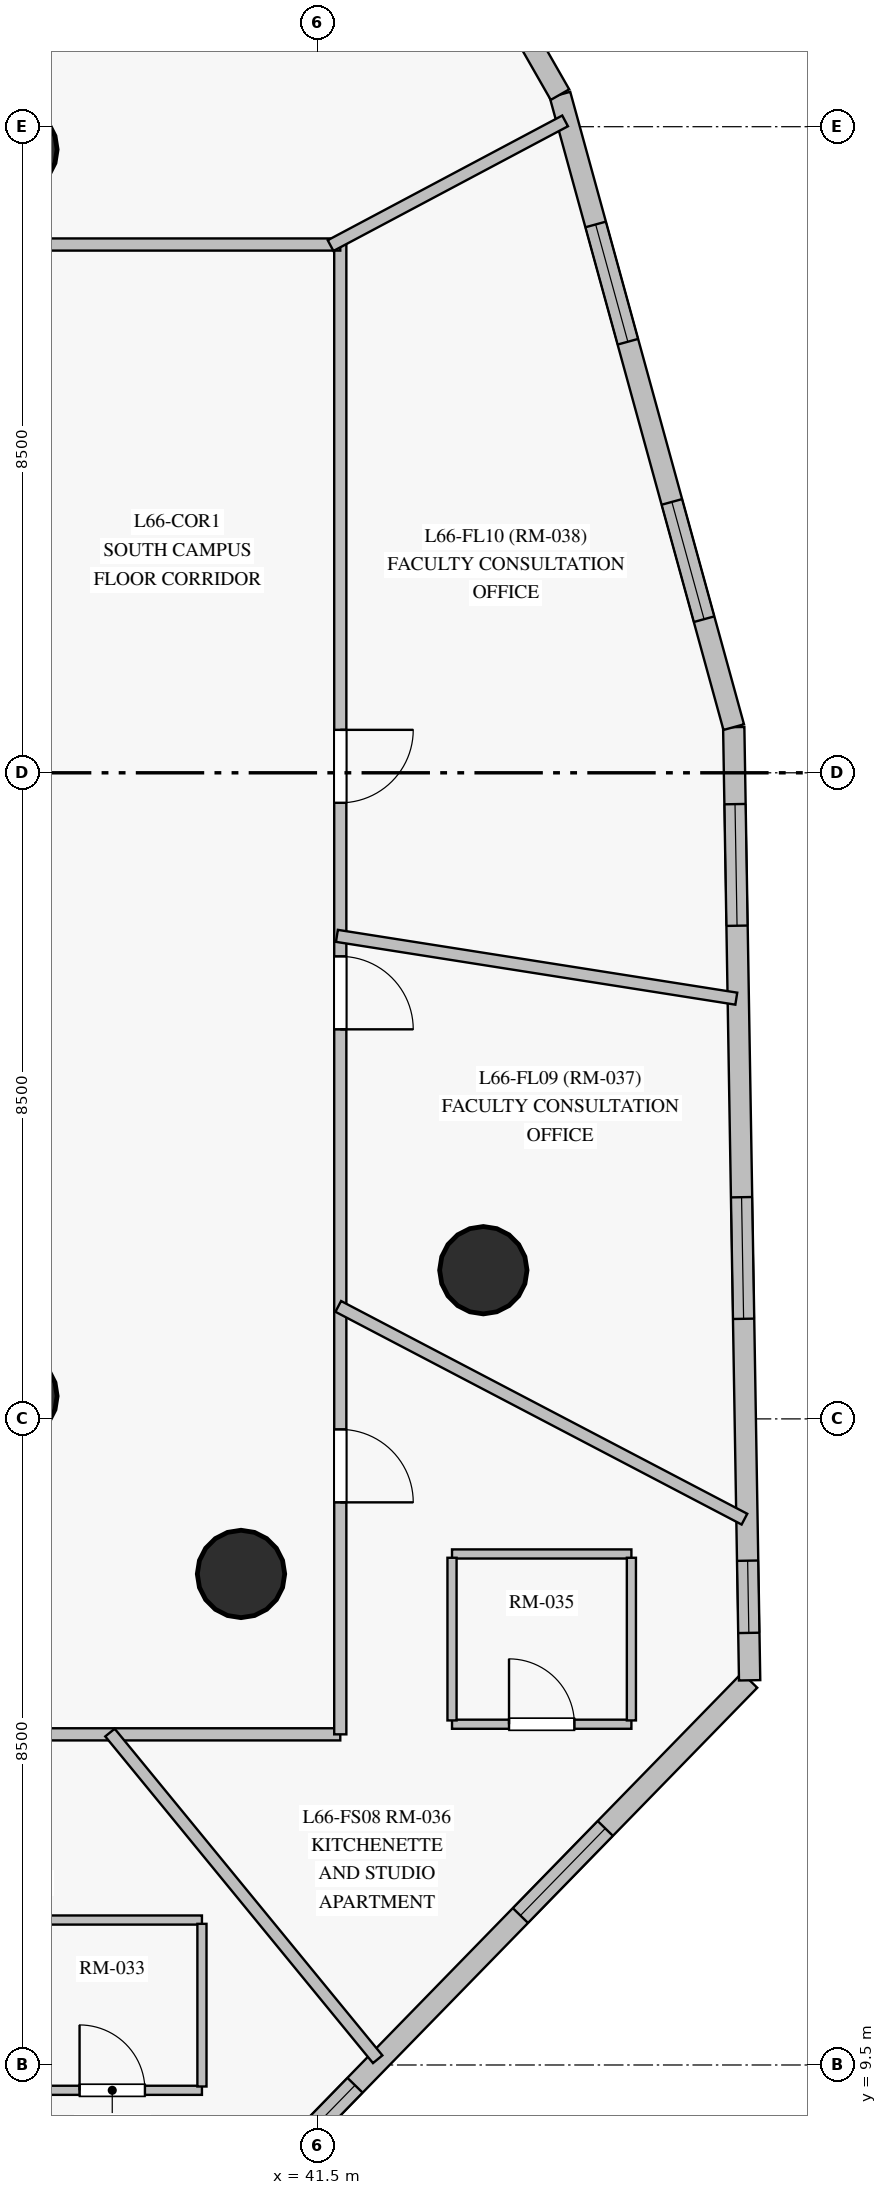
"""IFC4 building model, lengths in metres.
Left out: names, types, materials, properties, quantities, classifications, styles, units other than length and angle.
Written with IfcOpenShell. Run it as: python <this file> out.ifc"""

import sys

from ifc_helpers import new_model, si_unit, direction, frame, frame_2d, origin, origin_with_axes, origin_2d, place, context, subcontext, project, spatial, rectangle, circle, extrude, source, transform, mapped, element, fill, save


model = new_model("IFC4")
c1 = context("Model", 3, precision=1e-05, world=origin(), true_north=direction((0.0, 1.0)))
c2 = subcontext(c1, "Body", "Model", "MODEL_VIEW")
j1 = project(units=[si_unit("LENGTHUNIT", "METRE"), si_unit("PLANEANGLEUNIT", "RADIAN")], contexts=[c1])
p1 = place(None, origin())
s1 = spatial("IfcSite", under=j1, at=p1, CompositionType="ELEMENT")
p2 = place(p1, origin())
s2 = spatial("IfcBuilding", under=s1, at=p2, CompositionType="ELEMENT")
p3 = place(p2, frame((0.0, 0.0, 226.05)))
s3 = spatial("IfcBuildingStorey", under=s2, at=p3, CompositionType="ELEMENT", Elevation=226.05)
m1 = source(origin_with_axes(), c2, "Body", "SweptSolid", [
    extrude(circle(Radius=0.575, at=origin_2d()), origin(), (0.0, 0.0, 1.0), 3.05),
])
for number, where, z_axis, x_axis in (
    (1, (37.5, 18.3, 0.0), (0.0, 0.0, 1.0), (1.0, 0.0, 0.0)),
    (2, (37.5, 34.7, 0.0), (0.0, 0.0, 1.0), (1.0, 0.0, 0.0)),
    (3, (43.682, 19.956, 0.0), (0.0, 0.0, 1.0), (1.0, 0.0, 0.0)),
    (4, (40.494, 15.96, 0.0), (0.0, 0.0, 1.0), (1.0, 0.0, 0.0)),
):
    element("IfcColumn", number, at=place(p3, frame(where, z_axis=z_axis, x_axis=x_axis)), inside=s3, PredefinedType="COLUMN", context=c2, shape_type="MappedRepresentation", body=[
        mapped(m1, transform((0.0, 0.0, 0.0), scale=1.0)),
    ])
p4 = place(p3, frame((40.517, 7.717, 0.0), z_axis=(0.0, 0.0, 1.0), x_axis=(0.69791379091, 0.716181778921, 0.0)))
e5 = element("IfcWall", 5, at=p4, inside=s3, PredefinedType="SOLIDWALL", context=c2, shape_type="SweptSolid", body=[
    extrude(rectangle(XDim=9.556, YDim=0.28, at=frame_2d((4.778, 0.0))), origin(), (0.0, 0.0, 1.0), 2.85),
])
p5 = place(p4, frame((0.517, 0.0, 0.85)))
e6 = element("IfcOpeningElement", 6, at=p5, cuts=e5, PredefinedType="OPENING", context=c2, shape_type="SweptSolid", body=[
    extrude(rectangle(XDim=1.6, YDim=1.6, at=frame_2d((0.8, 0.8))), frame((0.0, 0.15, 0.0), z_axis=(0.0, -1.0, 0.0), x_axis=(1.0, 0.0, 0.0)), (0.0, 0.0, 1.0), 0.3),
])
p6 = place(p4, frame((5.235, 0.0, 0.85)))
e7 = element("IfcOpeningElement", 7, at=p6, cuts=e5, PredefinedType="OPENING", context=c2, shape_type="SweptSolid", body=[
    extrude(rectangle(XDim=1.6, YDim=1.6, at=frame_2d((0.8, 0.8))), frame((0.0, 0.15, 0.0), z_axis=(0.0, -1.0, 0.0), x_axis=(1.0, 0.0, 0.0)), (0.0, 0.0, 1.0), 0.3),
])
p7 = place(p3, frame((47.186, 14.561, 0.0), z_axis=(0.0, 0.0, 1.0), x_axis=(-0.016682840426, 0.999860831734, 0.0)))
e8 = element("IfcWall", 8, at=p7, inside=s3, PredefinedType="SOLIDWALL", context=c2, shape_type="SweptSolid", body=[
    extrude(rectangle(XDim=12.542, YDim=0.28, at=frame_2d((6.271, 0.0))), origin(), (0.0, 0.0, 1.0), 2.85),
])
p8 = place(p7, frame((0.624, 0.0, 0.85)))
e9 = element("IfcOpeningElement", 9, at=p8, cuts=e8, PredefinedType="OPENING", context=c2, shape_type="SweptSolid", body=[
    extrude(rectangle(XDim=0.95, YDim=1.5, at=frame_2d((0.475, 0.75))), frame((0.0, 0.15, 0.0), z_axis=(0.0, -1.0, 0.0), x_axis=(1.0, 0.0, 0.0)), (0.0, 0.0, 1.0), 0.3),
])
p9 = place(p7, frame((4.757, 0.0, 0.85)))
e10 = element("IfcOpeningElement", 10, at=p9, cuts=e8, PredefinedType="OPENING", context=c2, shape_type="SweptSolid", body=[
    extrude(rectangle(XDim=1.6, YDim=1.6, at=frame_2d((0.8, 0.8))), frame((0.0, 0.15, 0.0), z_axis=(0.0, -1.0, 0.0), x_axis=(1.0, 0.0, 0.0)), (0.0, 0.0, 1.0), 0.3),
])
p10 = place(p7, frame((9.928, 0.0, 0.85)))
e11 = element("IfcOpeningElement", 11, at=p10, cuts=e8, PredefinedType="OPENING", context=c2, shape_type="SweptSolid", body=[
    extrude(rectangle(XDim=1.6, YDim=1.6, at=frame_2d((0.8, 0.8))), frame((0.0, 0.15, 0.0), z_axis=(0.0, -1.0, 0.0), x_axis=(1.0, 0.0, 0.0)), (0.0, 0.0, 1.0), 0.3),
])
p11 = place(p3, frame((46.976, 27.101, 0.0), z_axis=(0.0, 0.0, 1.0), x_axis=(-0.264883595198, 0.964280395422, 0.0)))
e12 = element("IfcWall", 12, at=p11, inside=s3, PredefinedType="SOLIDWALL", context=c2, shape_type="SweptSolid", body=[
    extrude(rectangle(XDim=8.63, YDim=0.28, at=frame_2d((4.315, 0.0))), origin(), (0.0, 0.0, 1.0), 2.85),
])
p12 = place(p11, frame((1.473, 0.0, 0.85)))
e13 = element("IfcOpeningElement", 13, at=p12, cuts=e12, PredefinedType="OPENING", context=c2, shape_type="SweptSolid", body=[
    extrude(rectangle(XDim=1.6, YDim=1.6, at=frame_2d((0.8, 0.8))), frame((0.0, 0.15, 0.0), z_axis=(0.0, -1.0, 0.0), x_axis=(1.0, 0.0, 0.0)), (0.0, 0.0, 1.0), 0.3),
])
p13 = place(p11, frame((5.258, 0.0, 0.85)))
e14 = element("IfcOpeningElement", 14, at=p13, cuts=e12, PredefinedType="OPENING", context=c2, shape_type="SweptSolid", body=[
    extrude(rectangle(XDim=1.6, YDim=1.6, at=frame_2d((0.8, 0.8))), frame((0.0, 0.15, 0.0), z_axis=(0.0, -1.0, 0.0), x_axis=(1.0, 0.0, 0.0)), (0.0, 0.0, 1.0), 0.3),
])
p14 = place(p3, frame((44.69, 35.422, 0.0), z_axis=(0.0, 0.0, 1.0), x_axis=(-0.496436598051, 0.868072983173, 0.0)))
e15 = element("IfcWall", 15, at=p14, inside=s3, PredefinedType="SOLIDWALL", context=c2, shape_type="SweptSolid", body=[
    extrude(rectangle(XDim=12.542, YDim=0.28, at=frame_2d((6.271, 0.0))), origin(), (0.0, 0.0, 1.0), 2.85),
])
p15 = place(p14, frame((1.544, 0.0, 0.85)))
e16 = element("IfcOpeningElement", 16, at=p15, cuts=e15, PredefinedType="OPENING", context=c2, shape_type="SweptSolid", body=[
    extrude(rectangle(XDim=1.6, YDim=1.6, at=frame_2d((0.8, 0.8))), frame((0.0, 0.15, 0.0), z_axis=(0.0, -1.0, 0.0), x_axis=(1.0, 0.0, 0.0)), (0.0, 0.0, 1.0), 0.3),
])
p16 = place(p14, frame((5.471, 0.0, 0.85)))
e17 = element("IfcOpeningElement", 17, at=p16, cuts=e15, PredefinedType="OPENING", context=c2, shape_type="SweptSolid", body=[
    extrude(rectangle(XDim=1.6, YDim=1.6, at=frame_2d((0.8, 0.8))), frame((0.0, 0.15, 0.0), z_axis=(0.0, -1.0, 0.0), x_axis=(1.0, 0.0, 0.0)), (0.0, 0.0, 1.0), 0.3),
])
p17 = place(p14, frame((9.398, 0.0, 0.85)))
e18 = element("IfcOpeningElement", 18, at=p17, cuts=e15, PredefinedType="OPENING", context=c2, shape_type="SweptSolid", body=[
    extrude(rectangle(XDim=1.6, YDim=1.6, at=frame_2d((0.8, 0.8))), frame((0.0, 0.15, 0.0), z_axis=(0.0, -1.0, 0.0), x_axis=(1.0, 0.0, 0.0)), (0.0, 0.0, 1.0), 0.3),
])
p18 = place(p3, frame((41.8, 13.85, 0.0), z_axis=(0.0, 0.0, 1.0), x_axis=(-1.0, 0.0, 0.0)))
e19 = element("IfcWall", 19, at=p18, inside=s3, PredefinedType="PARTITIONING", context=c2, shape_type="SweptSolid", body=[
    extrude(rectangle(XDim=25.05, YDim=0.16, at=frame_2d((12.525, 0.0))), origin(), (0.0, 0.0, 1.0), 2.3),
])
p19 = place(p18, frame((9.563, 0.0, 0.0)))
e20 = element("IfcOpeningElement", 20, at=p19, cuts=e19, PredefinedType="OPENING", context=c2, shape_type="SweptSolid", body=[
    extrude(rectangle(XDim=0.96, YDim=2.15, at=frame_2d((0.48, 1.075))), frame((0.0, 0.09, 0.0), z_axis=(0.0, -1.0, 0.0), x_axis=(1.0, 0.0, 0.0)), (0.0, 0.0, 1.0), 0.18),
])
p20 = place(p18, frame((4.621, 0.0, 0.0)))
e21 = element("IfcOpeningElement", 21, at=p20, cuts=e19, PredefinedType="OPENING", context=c2, shape_type="SweptSolid", body=[
    extrude(rectangle(XDim=0.96, YDim=2.15, at=frame_2d((0.48, 1.075))), frame((0.0, 0.09, 0.0), z_axis=(0.0, -1.0, 0.0), x_axis=(1.0, 0.0, 0.0)), (0.0, 0.0, 1.0), 0.18),
])
p21 = place(p18, frame((18.312, 0.0, 0.0)))
e22 = element("IfcOpeningElement", 22, at=p21, cuts=e19, PredefinedType="OPENING", context=c2, shape_type="SweptSolid", body=[
    extrude(rectangle(XDim=0.96, YDim=2.15, at=frame_2d((0.48, 1.075))), frame((0.0, 0.09, 0.0), z_axis=(0.0, -1.0, 0.0), x_axis=(1.0, 0.0, 0.0)), (0.0, 0.0, 1.0), 0.18),
])
p22 = place(p18, frame((15.808, 0.0, 0.0)))
e23 = element("IfcOpeningElement", 23, at=p22, cuts=e19, PredefinedType="OPENING", context=c2, shape_type="SweptSolid", body=[
    extrude(rectangle(XDim=0.96, YDim=2.15, at=frame_2d((0.48, 1.075))), frame((0.0, 0.09, 0.0), z_axis=(0.0, -1.0, 0.0), x_axis=(1.0, 0.0, 0.0)), (0.0, 0.0, 1.0), 0.18),
])
p23 = place(p3, frame((41.8, 33.45, 0.0), z_axis=(0.0, 0.0, 1.0), x_axis=(0.0, -1.0, 0.0)))
e24 = element("IfcWall", 24, at=p23, inside=s3, PredefinedType="PARTITIONING", context=c2, shape_type="SweptSolid", body=[
    extrude(rectangle(XDim=19.6, YDim=0.16, at=frame_2d((9.8, 0.0))), origin(), (0.0, 0.0, 1.0), 2.3),
])
p24 = place(p23, frame((15.588, 0.0, 0.0)))
e25 = element("IfcOpeningElement", 25, at=p24, cuts=e24, PredefinedType="OPENING", context=c2, shape_type="SweptSolid", body=[
    extrude(rectangle(XDim=0.96, YDim=2.15, at=frame_2d((0.48, 1.075))), frame((0.0, 0.09, 0.0), z_axis=(0.0, -1.0, 0.0), x_axis=(1.0, 0.0, 0.0)), (0.0, 0.0, 1.0), 0.18),
])
p25 = place(p23, frame((9.365, 0.0, 0.0)))
e26 = element("IfcOpeningElement", 26, at=p25, cuts=e24, PredefinedType="OPENING", context=c2, shape_type="SweptSolid", body=[
    extrude(rectangle(XDim=0.96, YDim=2.15, at=frame_2d((0.48, 1.075))), frame((0.0, 0.09, 0.0), z_axis=(0.0, -1.0, 0.0), x_axis=(1.0, 0.0, 0.0)), (0.0, 0.0, 1.0), 0.18),
])
p26 = place(p23, frame((6.385, 0.0, 0.0)))
e27 = element("IfcOpeningElement", 27, at=p26, cuts=e24, PredefinedType="OPENING", context=c2, shape_type="SweptSolid", body=[
    extrude(rectangle(XDim=0.96, YDim=2.15, at=frame_2d((0.48, 1.075))), frame((0.0, 0.09, 0.0), z_axis=(0.0, -1.0, 0.0), x_axis=(1.0, 0.0, 0.0)), (0.0, 0.0, 1.0), 0.18),
])
p27 = place(p3, frame((41.773, 19.48, 0.0), z_axis=(0.0, 0.0, 1.0), x_axis=(0.885850546282, -0.463970699131, 0.0)))
e28 = element("IfcWall", 28, at=p27, inside=s3, PredefinedType="PARTITIONING", context=c2, shape_type="SweptSolid", body=[
    extrude(rectangle(XDim=6.032, YDim=0.16, at=frame_2d((3.016, 0.0))), origin(), (0.0, 0.0, 1.0), 2.35),
])
p28 = place(p3, frame((38.77, 13.873, 0.0), z_axis=(0.0, 0.0, 1.0), x_axis=(0.633835753928, -0.773467670328, 0.0)))
e29 = element("IfcWall", 29, at=p28, inside=s3, PredefinedType="PARTITIONING", context=c2, shape_type="SweptSolid", body=[
    extrude(rectangle(XDim=5.557, YDim=0.16, at=frame_2d((2.778, 0.0))), origin(), (0.0, 0.0, 1.0), 2.85),
])
p29 = place(p3, frame((41.756, 24.355, 0.0), z_axis=(0.0, 0.0, 1.0), x_axis=(0.987863244452, -0.155326141587, 0.0)))
e30 = element("IfcWall", 30, at=p29, inside=s3, PredefinedType="PARTITIONING", context=c2, shape_type="SweptSolid", body=[
    extrude(rectangle(XDim=5.319, YDim=0.16, at=frame_2d((2.659, 0.0))), origin(), (0.0, 0.0, 1.0), 2.85),
])
p30 = place(p3, frame((37.682, 33.45, 0.0), z_axis=(0.0, 0.0, 1.0), x_axis=(1.0, 0.0, 0.0)))
e31 = element("IfcWall", 31, at=p30, inside=s3, PredefinedType="PARTITIONING", context=c2, shape_type="SweptSolid", body=[
    extrude(rectangle(XDim=4.118, YDim=0.16, at=frame_2d((2.059, 0.0))), origin(), (0.0, 0.0, 1.0), 2.85),
])
p31 = place(p3, frame((41.672, 33.436, 0.0), z_axis=(0.0, 0.0, 1.0), x_axis=(0.882940173144, 0.469485516975, 0.0)))
e32 = element("IfcWall", 32, at=p31, inside=s3, PredefinedType="PARTITIONING", context=c2, shape_type="SweptSolid", body=[
    extrude(rectangle(XDim=3.495, YDim=0.16, at=frame_2d((1.747, 0.0))), origin(), (0.0, 0.0, 1.0), 2.85),
])
p32 = place(p3, frame((37.62, 9.167, 0.0), z_axis=(0.0, 0.0, 1.0), x_axis=(1.0, 0.0, 0.0)))
e33 = element("IfcWall", 33, at=p32, inside=s3, PredefinedType="PARTITIONING", context=c2, shape_type="SweptSolid", body=[
    extrude(rectangle(XDim=2.36, YDim=0.12, at=frame_2d((1.18, 0.0))), origin(), (0.0, 0.0, 1.0), 2.85),
])
p33 = place(p32, frame((0.75, 0.0, 0.0)))
e34 = element("IfcOpeningElement", 34, at=p33, cuts=e33, PredefinedType="OPENING", context=c2, shape_type="SweptSolid", body=[
    extrude(rectangle(XDim=0.86, YDim=2.1, at=frame_2d((0.43, 1.05))), frame((0.0, 0.07, 0.0), z_axis=(0.0, -1.0, 0.0), x_axis=(1.0, 0.0, 0.0)), (0.0, 0.0, 1.0), 0.14),
])
p34 = place(p3, frame((39.98, 11.407, 0.0), z_axis=(0.0, 0.0, 1.0), x_axis=(-1.0, 0.0, 0.0)))
e35 = element("IfcWall", 35, at=p34, inside=s3, PredefinedType="PARTITIONING", context=c2, shape_type="SweptSolid", body=[
    extrude(rectangle(XDim=2.36, YDim=0.12, at=frame_2d((1.18, 0.0))), origin(), (0.0, 0.0, 1.0), 2.85),
])
p35 = place(p3, frame((43.27, 13.983, 0.0), z_axis=(0.0, 0.0, 1.0), x_axis=(1.0, 0.0, 0.0)))
e36 = element("IfcWall", 36, at=p35, inside=s3, PredefinedType="PARTITIONING", context=c2, shape_type="SweptSolid", body=[
    extrude(rectangle(XDim=2.36, YDim=0.12, at=frame_2d((1.18, 0.0))), origin(), (0.0, 0.0, 1.0), 2.85),
])
p36 = place(p35, frame((0.75, 0.0, 0.0)))
e37 = element("IfcOpeningElement", 37, at=p36, cuts=e36, PredefinedType="OPENING", context=c2, shape_type="SweptSolid", body=[
    extrude(rectangle(XDim=0.86, YDim=2.1, at=frame_2d((0.43, 1.05))), frame((0.0, 0.07, 0.0), z_axis=(0.0, -1.0, 0.0), x_axis=(1.0, 0.0, 0.0)), (0.0, 0.0, 1.0), 0.14),
])
p37 = place(p3, frame((45.63, 16.223, 0.0), z_axis=(0.0, 0.0, 1.0), x_axis=(-1.0, 0.0, 0.0)))
e38 = element("IfcWall", 38, at=p37, inside=s3, PredefinedType="PARTITIONING", context=c2, shape_type="SweptSolid", body=[
    extrude(rectangle(XDim=2.36, YDim=0.12, at=frame_2d((1.18, 0.0))), origin(), (0.0, 0.0, 1.0), 2.85),
])
p38 = place(p3, frame((39.98, 9.217, 0.0), z_axis=(0.0, 0.0, 1.0), x_axis=(0.0, 1.0, 0.0)))
e39 = element("IfcWall", 39, at=p38, inside=s3, PredefinedType="PARTITIONING", context=c2, shape_type="SweptSolid", body=[
    extrude(rectangle(XDim=2.14, YDim=0.12, at=frame_2d((1.07, 0.0))), origin(), (0.0, 0.0, 1.0), 2.85),
])
for number, where, z_axis, x_axis in (
    (40, (45.63, 14.033, 0.0), (0.0, 0.0, 1.0), (0.0, 1.0, 0.0)),
    (41, (43.27, 16.173, 0.0), (0.0, 0.0, 1.0), (0.0, -1.0, 0.0)),
):
    element("IfcWall", number, at=place(p3, frame(where, z_axis=z_axis, x_axis=x_axis)), inside=s3, PredefinedType="PARTITIONING", context=c2, shape_type="SweptSolid", body=[
        extrude(rectangle(XDim=2.14, YDim=0.12, at=frame_2d((1.07, 0.0))), origin(), (0.0, 0.0, 1.0), 2.85),
    ])
m2 = source(origin_with_axes(), c2, "Body", "SweptSolid", [
    extrude(rectangle(XDim=1.6, YDim=1.6, at=frame_2d((0.8, 0.8))), frame((0.0, 0.03, 0.0), z_axis=(0.0, -1.0, 0.0), x_axis=(1.0, 0.0, 0.0)), (0.0, 0.0, 1.0), 0.06),
])
p39 = place(p5, origin())
e42 = element("IfcWindow", 42, at=p39, inside=s3, PartitioningType="SINGLE_PANEL", PredefinedType="WINDOW", context=c2, shape_type="MappedRepresentation", body=[
    mapped(m2, transform((0.0, 0.0, 0.0), scale=1.0)),
])
fill(e6, e42)
p40 = place(p6, origin())
e43 = element("IfcWindow", 43, at=p40, inside=s3, PartitioningType="SINGLE_PANEL", PredefinedType="WINDOW", context=c2, shape_type="MappedRepresentation", body=[
    mapped(m2, transform((0.0, 0.0, 0.0), scale=1.0)),
])
fill(e7, e43)
m3 = source(origin_with_axes(), c2, "Body", "SweptSolid", [
    extrude(rectangle(XDim=0.95, YDim=1.5, at=frame_2d((0.475, 0.75))), frame((0.0, 0.03, 0.0), z_axis=(0.0, -1.0, 0.0), x_axis=(1.0, 0.0, 0.0)), (0.0, 0.0, 1.0), 0.06),
])
p41 = place(p8, origin())
e44 = element("IfcWindow", 44, at=p41, inside=s3, PartitioningType="SINGLE_PANEL", PredefinedType="WINDOW", context=c2, shape_type="MappedRepresentation", body=[
    mapped(m3, transform((0.0, 0.0, 0.0), scale=1.0)),
])
fill(e9, e44)
p42 = place(p9, origin())
e45 = element("IfcWindow", 45, at=p42, inside=s3, PartitioningType="SINGLE_PANEL", PredefinedType="WINDOW", context=c2, shape_type="MappedRepresentation", body=[
    mapped(m2, transform((0.0, 0.0, 0.0), scale=1.0)),
])
fill(e10, e45)
p43 = place(p10, origin())
e46 = element("IfcWindow", 46, at=p43, inside=s3, PartitioningType="SINGLE_PANEL", PredefinedType="WINDOW", context=c2, shape_type="MappedRepresentation", body=[
    mapped(m2, transform((0.0, 0.0, 0.0), scale=1.0)),
])
fill(e11, e46)
p44 = place(p12, origin())
e47 = element("IfcWindow", 47, at=p44, inside=s3, PartitioningType="SINGLE_PANEL", PredefinedType="WINDOW", context=c2, shape_type="MappedRepresentation", body=[
    mapped(m2, transform((0.0, 0.0, 0.0), scale=1.0)),
])
fill(e13, e47)
p45 = place(p13, origin())
e48 = element("IfcWindow", 48, at=p45, inside=s3, PartitioningType="SINGLE_PANEL", PredefinedType="WINDOW", context=c2, shape_type="MappedRepresentation", body=[
    mapped(m2, transform((0.0, 0.0, 0.0), scale=1.0)),
])
fill(e14, e48)
m4 = source(origin_with_axes(), c2, "Body", "SweptSolid", [
    extrude(rectangle(XDim=0.86, YDim=2.1, at=frame_2d((0.43, 1.05))), frame((0.0, 0.025, 0.0), z_axis=(0.0, -1.0, 0.0), x_axis=(1.0, 0.0, 0.0)), (0.0, 0.0, 1.0), 0.05),
])
p46 = place(p33, origin())
e49 = element("IfcDoor", 49, at=p46, inside=s3, OperationType="SINGLE_SWING_LEFT", PredefinedType="DOOR", context=c2, shape_type="MappedRepresentation", body=[
    mapped(m4, transform((0.0, 0.0, 0.0), scale=1.0)),
])
fill(e34, e49)
p47 = place(p36, origin())
e50 = element("IfcDoor", 50, at=p47, inside=s3, OperationType="SINGLE_SWING_LEFT", PredefinedType="DOOR", context=c2, shape_type="MappedRepresentation", body=[
    mapped(m4, transform((0.0, 0.0, 0.0), scale=1.0)),
])
fill(e37, e50)
m5 = source(origin_with_axes(), c2, "Body", "SweptSolid", [
    extrude(rectangle(XDim=0.96, YDim=2.15, at=frame_2d((0.48, 1.075))), frame((0.0, 0.025, 0.0), z_axis=(0.0, -1.0, 0.0), x_axis=(1.0, 0.0, 0.0)), (0.0, 0.0, 1.0), 0.05),
])
p48 = place(p24, origin())
e51 = element("IfcDoor", 51, at=p48, inside=s3, OperationType="SINGLE_SWING_RIGHT", PredefinedType="DOOR", context=c2, shape_type="MappedRepresentation", body=[
    mapped(m5, transform((0.0, 0.0, 0.0), scale=1.0)),
])
fill(e25, e51)
p49 = place(p25, origin())
e52 = element("IfcDoor", 52, at=p49, inside=s3, OperationType="SINGLE_SWING_RIGHT", PredefinedType="DOOR", context=c2, shape_type="MappedRepresentation", body=[
    mapped(m5, transform((0.0, 0.0, 0.0), scale=1.0)),
])
fill(e26, e52)
p50 = place(p26, origin())
e53 = element("IfcDoor", 53, at=p50, inside=s3, OperationType="SINGLE_SWING_LEFT", PredefinedType="DOOR", context=c2, shape_type="MappedRepresentation", body=[
    mapped(m5, transform((0.0, 0.0, 0.0), scale=1.0)),
])
fill(e27, e53)
save(model, sys.argv[1])
